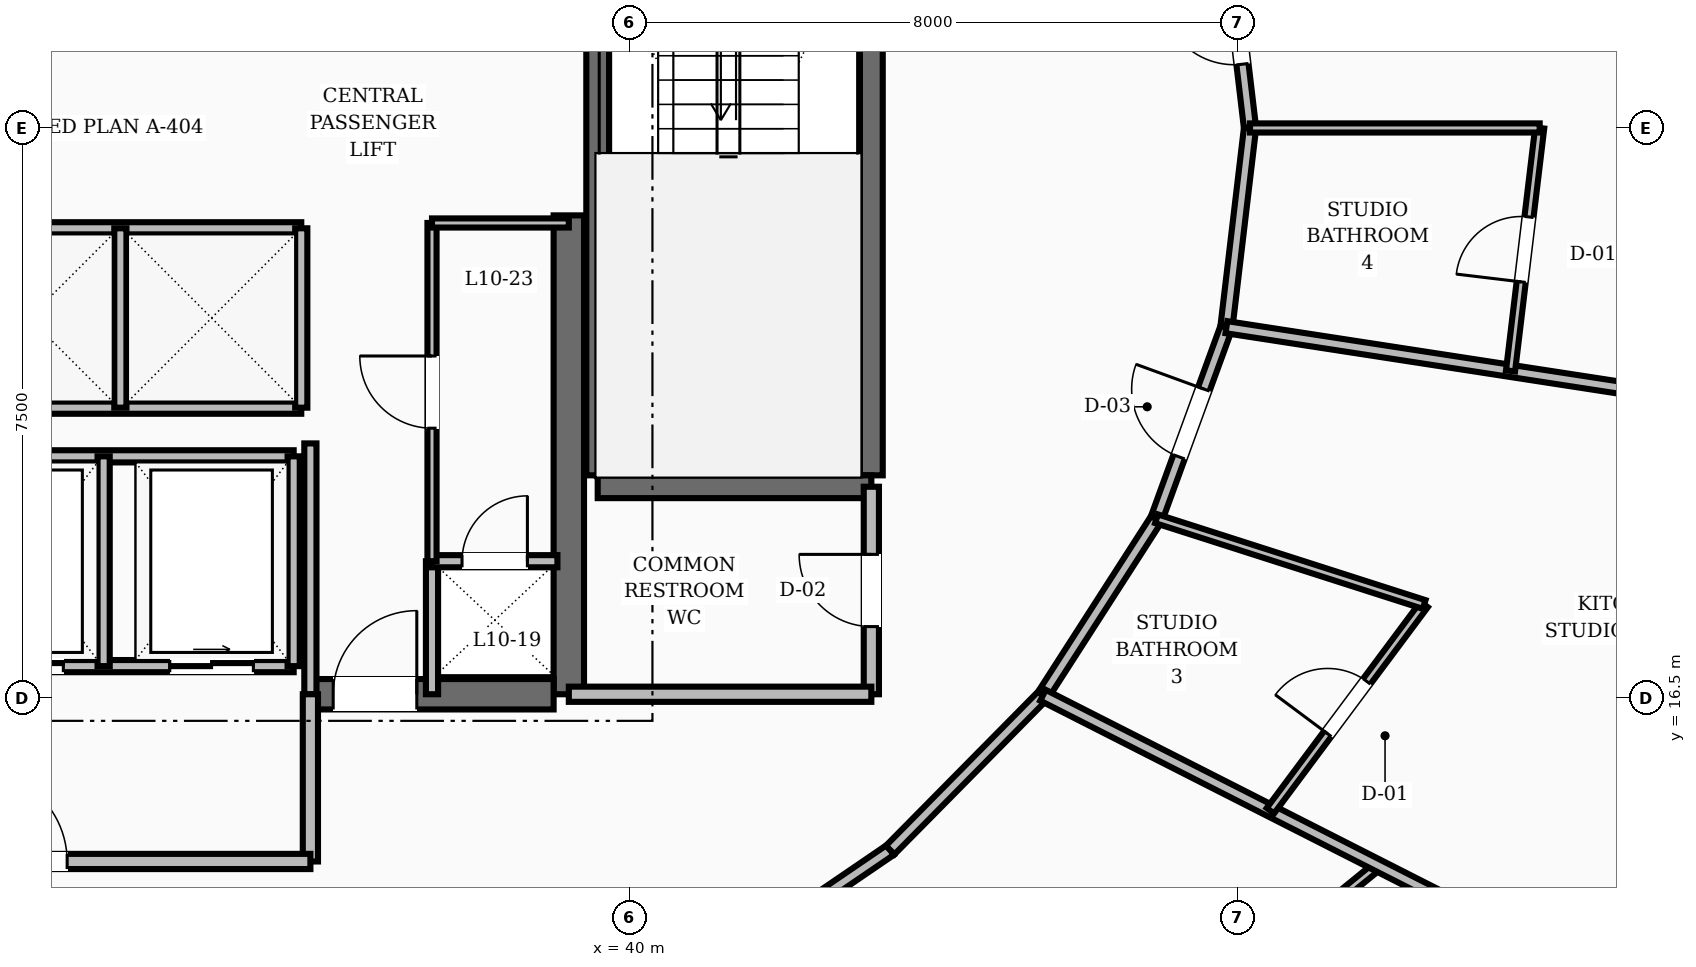
"""IFC4 building model, lengths in metres.
Left out: names, types, materials, properties, quantities, classifications, styles, units other than length and angle.
Written with IfcOpenShell. Run it as: python <this file> out.ifc"""

import sys

from ifc_helpers import new_model, si_unit, direction, frame, frame_2d, origin, place, context, subcontext, project, spatial, rectangle, extrude, element, fill, save


model = new_model("IFC4")
c1 = context("Model", 3, precision=1e-05, world=origin(), true_north=direction((0.0, 1.0)))
c2 = subcontext(c1, "Body", "Model", "MODEL_VIEW")
j1 = project(units=[si_unit("LENGTHUNIT", "METRE"), si_unit("PLANEANGLEUNIT", "RADIAN")], contexts=[c1])
p1 = place(None, origin())
s1 = spatial("IfcSite", under=j1, at=p1, CompositionType="ELEMENT")
p2 = place(p1, origin())
s2 = spatial("IfcBuilding", under=s1, at=p2, CompositionType="ELEMENT")
p3 = place(p2, frame((0.0, 0.0, 44.8)))
s3 = spatial("IfcBuildingStorey", under=s2, at=p3, CompositionType="ELEMENT", Elevation=44.8)
p4 = place(p3, frame((39.2, 16.55, 0.0), z_axis=(0.0, 0.0, 1.0), x_axis=(0.0, 1.0, 0.0)))
e1 = element("IfcWall", 1, at=p4, inside=s3, PredefinedType="SHEAR", context=c2, shape_type="SweptSolid", body=[
    extrude(rectangle(XDim=6.3, YDim=0.4, at=frame_2d((3.15, 0.0))), origin(), (0.0, 0.0, 1.0), 3.6),
])
p5 = place(p3, frame((35.8, 16.55, 0.0), z_axis=(0.0, 0.0, 1.0), x_axis=(1.0, 0.0, 0.0)))
e2 = element("IfcWall", 2, at=p5, inside=s3, PredefinedType="SHEAR", context=c2, shape_type="SweptSolid", body=[
    extrude(rectangle(XDim=3.2, YDim=0.4, at=frame_2d((1.6, 0.0))), origin(), (0.0, 0.0, 1.0), 3.6),
])
p6 = place(p5, frame((0.3, 0.0, 0.0)))
e3 = element("IfcOpeningElement", 3, at=p6, cuts=e2, PredefinedType="OPENING", context=c2, shape_type="SweptSolid", body=[
    extrude(rectangle(XDim=1.1, YDim=2.1, at=frame_2d((0.55, 1.05))), frame((0.0, 0.21, 0.0), z_axis=(0.0, -1.0, 0.0), x_axis=(1.0, 0.0, 0.0)), (0.0, 0.0, 1.0), 0.42),
])
for number, where, z_axis, x_axis in (
    (4, (43.18, 19.43, 0.0), (0.0, 0.0, 1.0), (0.0, 1.0, 0.0)),
    (5, (39.58, 19.43, 0.0), (0.0, 0.0, 1.0), (0.0, 1.0, 0.0)),
):
    element("IfcWall", number, at=place(p3, frame(where, z_axis=z_axis, x_axis=x_axis)), inside=s3, PredefinedType="SHEAR", context=c2, shape_type="SweptSolid", body=[
        extrude(rectangle(XDim=8.74, YDim=0.3, at=frame_2d((4.37, 0.0))), origin(), (0.0, 0.0, 1.0), 3.6),
    ])
p7 = place(p3, frame((39.58, 19.28, 0.0), z_axis=(0.0, 0.0, 1.0), x_axis=(1.0, 0.0, 0.0)))
e6 = element("IfcWall", 6, at=p7, inside=s3, PredefinedType="SHEAR", context=c2, shape_type="SweptSolid", body=[
    extrude(rectangle(XDim=3.6, YDim=0.3, at=frame_2d((1.8, 0.0))), origin(), (0.0, 0.0, 1.0), 3.6),
])
p8 = place(p3, frame((43.18, 16.55, 0.0), z_axis=(0.0, 0.0, 1.0), x_axis=(0.0, 1.0, 0.0)))
e7 = element("IfcWall", 7, at=p8, inside=s3, PredefinedType="SOLIDWALL", context=c2, shape_type="SweptSolid", body=[
    extrude(rectangle(XDim=2.73, YDim=0.2, at=frame_2d((1.365, 0.0))), origin(), (0.0, 0.0, 1.0), 2.61),
])
p9 = place(p8, frame((0.89, 0.0, 0.0)))
e8 = element("IfcOpeningElement", 8, at=p9, cuts=e7, PredefinedType="OPENING", context=c2, shape_type="SweptSolid", body=[
    extrude(rectangle(XDim=0.95, YDim=2.1, at=frame_2d((0.475, 1.05))), frame((0.0, 0.11, 0.0), z_axis=(0.0, -1.0, 0.0), x_axis=(1.0, 0.0, 0.0)), (0.0, 0.0, 1.0), 0.22),
])
p10 = place(p3, frame((39.2, 16.55, 0.0), z_axis=(0.0, 0.0, 1.0), x_axis=(1.0, 0.0, 0.0)))
e9 = element("IfcWall", 9, at=p10, inside=s3, PredefinedType="SOLIDWALL", context=c2, shape_type="SweptSolid", body=[
    extrude(rectangle(XDim=3.98, YDim=0.2, at=frame_2d((1.99, 0.0))), origin(), (0.0, 0.0, 1.0), 2.61),
])
p11 = place(p3, frame((35.8, 16.55, 0.0), z_axis=(0.0, 0.0, 1.0), x_axis=(0.0, 1.0, 0.0)))
e10 = element("IfcWall", 10, at=p11, inside=s3, PredefinedType="SOLIDWALL", context=c2, shape_type="SweptSolid", body=[
    extrude(rectangle(XDim=3.3, YDim=0.16, at=frame_2d((1.65, 0.0))), origin(), (0.0, 0.0, 1.0), 2.61),
])
p12 = place(p3, frame((37.4, 16.55, 0.0), z_axis=(0.0, 0.0, 1.0), x_axis=(0.0, 1.0, 0.0)))
e11 = element("IfcWall", 11, at=p12, inside=s3, PredefinedType="SOLIDWALL", context=c2, shape_type="SweptSolid", body=[
    extrude(rectangle(XDim=1.75, YDim=0.16, at=frame_2d((0.875, 0.0))), origin(), (0.0, 0.0, 1.0), 2.61),
])
p13 = place(p3, frame((35.8, 14.35, 0.0), z_axis=(0.0, 0.0, 1.0), x_axis=(0.0, 1.0, 0.0)))
e12 = element("IfcWall", 12, at=p13, inside=s3, PredefinedType="SOLIDWALL", context=c2, shape_type="SweptSolid", body=[
    extrude(rectangle(XDim=2.2, YDim=0.2, at=frame_2d((1.1, 0.0))), origin(), (0.0, 0.0, 1.0), 2.61),
])
p14 = place(p3, frame((28.2, 14.35, 0.0), z_axis=(0.0, 0.0, 1.0), x_axis=(1.0, 0.0, 0.0)))
e13 = element("IfcWall", 13, at=p14, inside=s3, PredefinedType="SOLIDWALL", context=c2, shape_type="SweptSolid", body=[
    extrude(rectangle(XDim=7.6, YDim=0.2, at=frame_2d((3.8, 0.0))), origin(), (0.0, 0.0, 1.0), 2.61),
])
p15 = place(p14, frame((3.2, 0.0, 0.0)))
e14 = element("IfcOpeningElement", 14, at=p15, cuts=e13, PredefinedType="OPENING", context=c2, shape_type="SweptSolid", body=[
    extrude(rectangle(XDim=1.2, YDim=2.1, at=frame_2d((0.6, 1.05))), frame((0.0, 0.11, 0.0), z_axis=(0.0, -1.0, 0.0), x_axis=(1.0, 0.0, 0.0)), (0.0, 0.0, 1.0), 0.22),
])
for number, where, z_axis, x_axis in (
    (15, (30.92, 22.68, 0.0), (0.0, 0.0, 1.0), (1.0, 0.0, 0.0)),
    (16, (30.92, 20.32, 0.0), (0.0, 0.0, 1.0), (1.0, 0.0, 0.0)),
):
    element("IfcWall", number, at=place(p3, frame(where, z_axis=z_axis, x_axis=x_axis)), inside=s3, PredefinedType="SOLIDWALL", context=c2, shape_type="SweptSolid", body=[
        extrude(rectangle(XDim=4.76, YDim=0.16, at=frame_2d((2.38, 0.0))), origin(), (0.0, 0.0, 1.0), 2.61),
    ])
for number, where, z_axis, x_axis in (
    (17, (33.3, 20.32, 0.0), (0.0, 0.0, 1.0), (0.0, 1.0, 0.0)),
    (18, (35.68, 20.32, 0.0), (0.0, 0.0, 1.0), (0.0, 1.0, 0.0)),
):
    element("IfcWall", number, at=place(p3, frame(where, z_axis=z_axis, x_axis=x_axis)), inside=s3, PredefinedType="SOLIDWALL", context=c2, shape_type="SweptSolid", body=[
        extrude(rectangle(XDim=2.36, YDim=0.16, at=frame_2d((1.18, 0.0))), origin(), (0.0, 0.0, 1.0), 2.61),
    ])
p16 = place(p3, frame((28.42, 16.92, 0.0), z_axis=(0.0, 0.0, 1.0), x_axis=(1.0, 0.0, 0.0)))
e19 = element("IfcWall", 19, at=p16, inside=s3, PredefinedType="SOLIDWALL", context=c2, shape_type="SweptSolid", body=[
    extrude(rectangle(XDim=7.16, YDim=0.16, at=frame_2d((3.58, 0.0))), origin(), (0.0, 0.0, 1.0), 2.61),
])
p17 = place(p16, frame((0.53, 0.0, 0.0)))
e20 = element("IfcOpeningElement", 20, at=p17, cuts=e19, PredefinedType="OPENING", context=c2, shape_type="SweptSolid", body=[
    extrude(rectangle(XDim=1.1, YDim=2.15, at=frame_2d((0.55, 1.075))), frame((0.0, 0.09, 0.0), z_axis=(0.0, -1.0, 0.0), x_axis=(1.0, 0.0, 0.0)), (0.0, 0.0, 1.0), 0.18),
])
p18 = place(p16, frame((3.03, 0.0, 0.0)))
e21 = element("IfcOpeningElement", 21, at=p18, cuts=e19, PredefinedType="OPENING", context=c2, shape_type="SweptSolid", body=[
    extrude(rectangle(XDim=1.1, YDim=2.15, at=frame_2d((0.55, 1.075))), frame((0.0, 0.09, 0.0), z_axis=(0.0, -1.0, 0.0), x_axis=(1.0, 0.0, 0.0)), (0.0, 0.0, 1.0), 0.18),
])
p19 = place(p16, frame((5.53, 0.0, 0.0)))
e22 = element("IfcOpeningElement", 22, at=p19, cuts=e19, PredefinedType="OPENING", context=c2, shape_type="SweptSolid", body=[
    extrude(rectangle(XDim=1.1, YDim=2.15, at=frame_2d((0.55, 1.075))), frame((0.0, 0.09, 0.0), z_axis=(0.0, -1.0, 0.0), x_axis=(1.0, 0.0, 0.0)), (0.0, 0.0, 1.0), 0.18),
])
p20 = place(p3, frame((28.42, 19.68, 0.0), z_axis=(0.0, 0.0, 1.0), x_axis=(1.0, 0.0, 0.0)))
e23 = element("IfcWall", 23, at=p20, inside=s3, PredefinedType="SOLIDWALL", context=c2, shape_type="SweptSolid", body=[
    extrude(rectangle(XDim=7.16, YDim=0.16, at=frame_2d((3.58, 0.0))), origin(), (0.0, 0.0, 1.0), 2.61),
])
for number, where, z_axis, x_axis in (
    (24, (33.08, 16.92, 0.0), (0.0, 0.0, 1.0), (0.0, 1.0, 0.0)),
    (25, (35.58, 16.92, 0.0), (0.0, 0.0, 1.0), (0.0, 1.0, 0.0)),
):
    element("IfcWall", number, at=place(p3, frame(where, z_axis=z_axis, x_axis=x_axis)), inside=s3, PredefinedType="SOLIDWALL", context=c2, shape_type="SweptSolid", body=[
        extrude(rectangle(XDim=2.76, YDim=0.16, at=frame_2d((1.38, 0.0))), origin(), (0.0, 0.0, 1.0), 2.61),
    ])
p21 = place(p3, frame((37.4, 18.3, 0.0), z_axis=(0.0, 0.0, 1.0), x_axis=(1.0, 0.0, 0.0)))
e26 = element("IfcWall", 26, at=p21, inside=s3, PredefinedType="SOLIDWALL", context=c2, shape_type="SweptSolid", body=[
    extrude(rectangle(XDim=1.65, YDim=0.16, at=frame_2d((0.825, 0.0))), origin(), (0.0, 0.0, 1.0), 2.61),
])
p22 = place(p21, frame((0.395, 0.0, 0.0)))
e27 = element("IfcOpeningElement", 27, at=p22, cuts=e26, PredefinedType="OPENING", context=c2, shape_type="SweptSolid", body=[
    extrude(rectangle(XDim=0.86, YDim=2.1, at=frame_2d((0.43, 1.05))), frame((0.0, 0.09, 0.0), z_axis=(0.0, -1.0, 0.0), x_axis=(1.0, 0.0, 0.0)), (0.0, 0.0, 1.0), 0.18),
])
p23 = place(p3, frame((37.4, 18.3, 0.0), z_axis=(0.0, 0.0, 1.0), x_axis=(0.0, 1.0, 0.0)))
e28 = element("IfcWall", 28, at=p23, inside=s3, PredefinedType="PARTITIONING", context=c2, shape_type="SweptSolid", body=[
    extrude(rectangle(XDim=4.45, YDim=0.12, at=frame_2d((2.225, 0.0))), origin(), (0.0, 0.0, 1.0), 2.61),
])
p24 = place(p23, frame((1.75, 0.0, 0.0)))
e29 = element("IfcOpeningElement", 29, at=p24, cuts=e28, PredefinedType="OPENING", context=c2, shape_type="SweptSolid", body=[
    extrude(rectangle(XDim=0.95, YDim=2.1, at=frame_2d((0.475, 1.05))), frame((0.0, 0.07, 0.0), z_axis=(0.0, -1.0, 0.0), x_axis=(1.0, 0.0, 0.0)), (0.0, 0.0, 1.0), 0.14),
])
p25 = place(p3, frame((37.4, 22.75, 0.0), z_axis=(0.0, 0.0, 1.0), x_axis=(1.0, 0.0, 0.0)))
e30 = element("IfcWall", 30, at=p25, inside=s3, PredefinedType="PARTITIONING", context=c2, shape_type="SweptSolid", body=[
    extrude(rectangle(XDim=1.8, YDim=0.12, at=frame_2d((0.9, 0.0))), origin(), (0.0, 0.0, 1.0), 2.61),
])
p26 = place(p3, frame((48.162, 24.0, 0.0), z_axis=(0.0, 0.0, 1.0), x_axis=(-0.117667763342, 0.993053018459, 0.0)))
e31 = element("IfcWall", 31, at=p26, inside=s3, PredefinedType="SOLIDWALL", context=c2, shape_type="SweptSolid", body=[
    extrude(rectangle(XDim=2.639, YDim=0.16, at=frame_2d((1.32, 0.0))), origin(), (0.0, 0.0, 1.0), 2.61),
])
p27 = place(p26, frame((0.844, 0.0, 0.0)))
e32 = element("IfcOpeningElement", 32, at=p27, cuts=e31, PredefinedType="OPENING", context=c2, shape_type="SweptSolid", body=[
    extrude(rectangle(XDim=0.95, YDim=2.1, at=frame_2d((0.475, 1.05))), frame((0.0, 0.09, 0.0), z_axis=(0.0, -1.0, 0.0), x_axis=(1.0, 0.0, 0.0)), (0.0, 0.0, 1.0), 0.18),
])
p28 = place(p3, frame((40.979, 12.83, 0.0), z_axis=(0.0, 0.0, 1.0), x_axis=(0.826112340767, 0.563505457323, 0.0)))
e33 = element("IfcWall", 33, at=p28, inside=s3, PredefinedType="SOLIDWALL", context=c2, shape_type="SweptSolid", body=[
    extrude(rectangle(XDim=2.965, YDim=0.16, at=frame_2d((1.482, 0.0))), origin(), (0.0, 0.0, 1.0), 2.61),
])
p29 = place(p3, frame((43.428, 14.501, 0.0), z_axis=(0.0, 0.0, 1.0), x_axis=(0.702569520063, 0.711615113301, 0.0)))
e34 = element("IfcWall", 34, at=p29, inside=s3, PredefinedType="SOLIDWALL", context=c2, shape_type="SweptSolid", body=[
    extrude(rectangle(XDim=2.861, YDim=0.16, at=frame_2d((1.43, 0.0))), origin(), (0.0, 0.0, 1.0), 2.61),
])
p30 = place(p3, frame((45.438, 16.537, 0.0), z_axis=(0.0, 0.0, 1.0), x_axis=(0.540891657444, 0.841092274907, 0.0)))
e35 = element("IfcWall", 35, at=p30, inside=s3, PredefinedType="SOLIDWALL", context=c2, shape_type="SweptSolid", body=[
    extrude(rectangle(XDim=2.761, YDim=0.16, at=frame_2d((1.38, 0.0))), origin(), (0.0, 0.0, 1.0), 2.61),
])
p31 = place(p3, frame((46.932, 18.859, 0.0), z_axis=(0.0, 0.0, 1.0), x_axis=(0.342882618672, 0.939378257047, 0.0)))
e36 = element("IfcWall", 36, at=p31, inside=s3, PredefinedType="SOLIDWALL", context=c2, shape_type="SweptSolid", body=[
    extrude(rectangle(XDim=2.683, YDim=0.16, at=frame_2d((1.341, 0.0))), origin(), (0.0, 0.0, 1.0), 2.61),
])
p32 = place(p31, frame((0.866, 0.0, 0.0)))
e37 = element("IfcOpeningElement", 37, at=p32, cuts=e36, PredefinedType="OPENING", context=c2, shape_type="SweptSolid", body=[
    extrude(rectangle(XDim=0.95, YDim=2.1, at=frame_2d((0.475, 1.05))), frame((0.0, 0.09, 0.0), z_axis=(0.0, -1.0, 0.0), x_axis=(1.0, 0.0, 0.0)), (0.0, 0.0, 1.0), 0.18),
])
p33 = place(p3, frame((47.852, 21.379, 0.0), z_axis=(0.0, 0.0, 1.0), x_axis=(0.117667763342, 0.993053018459, 0.0)))
e38 = element("IfcWall", 38, at=p33, inside=s3, PredefinedType="SOLIDWALL", context=c2, shape_type="SweptSolid", body=[
    extrude(rectangle(XDim=2.639, YDim=0.16, at=frame_2d((1.32, 0.0))), origin(), (0.0, 0.0, 1.0), 2.61),
])
p34 = place(p3, frame((43.925, 9.479, 0.0), z_axis=(0.0, 0.0, 1.0), x_axis=(0.775688329038, 0.631116166957, 0.0)))
e39 = element("IfcWall", 39, at=p34, inside=s3, PredefinedType="PARTITIONING", context=c2, shape_type="SweptSolid", body=[
    extrude(rectangle(XDim=7.635, YDim=0.12, at=frame_2d((3.817, 0.0))), origin(), (0.0, 0.0, 1.0), 2.61),
])
p35 = place(p34, frame((3.342, 0.0, 0.0)))
e40 = element("IfcOpeningElement", 40, at=p35, cuts=e39, PredefinedType="OPENING", context=c2, shape_type="SweptSolid", body=[
    extrude(rectangle(XDim=0.95, YDim=2.1, at=frame_2d((0.475, 1.05))), frame((0.0, 0.07, 0.0), z_axis=(0.0, -1.0, 0.0), x_axis=(1.0, 0.0, 0.0)), (0.0, 0.0, 1.0), 0.14),
])
p36 = place(p3, frame((45.438, 16.537, 0.0), z_axis=(0.0, 0.0, 1.0), x_axis=(0.891601143044, -0.452821600327, 0.0)))
e41 = element("IfcWall", 41, at=p36, inside=s3, PredefinedType="SOLIDWALL", context=c2, shape_type="SweptSolid", body=[
    extrude(rectangle(XDim=8.78, YDim=0.16, at=frame_2d((4.39, 0.0))), origin(), (0.0, 0.0, 1.0), 2.61),
])
p37 = place(p3, frame((48.43, 15.017, 0.0), z_axis=(0.0, 0.0, 1.0), x_axis=(0.597596813452, 0.801796762623, 0.0)))
e42 = element("IfcWall", 42, at=p37, inside=s3, PredefinedType="PARTITIONING", context=c2, shape_type="SweptSolid", body=[
    extrude(rectangle(XDim=3.385, YDim=0.12, at=frame_2d((1.692, 0.0))), origin(), (0.0, 0.0, 1.0), 2.61),
])
p38 = place(p37, frame((1.262, 0.0, 0.0)))
e43 = element("IfcOpeningElement", 43, at=p38, cuts=e42, PredefinedType="OPENING", context=c2, shape_type="SweptSolid", body=[
    extrude(rectangle(XDim=0.86, YDim=2.1, at=frame_2d((0.43, 1.05))), frame((0.0, 0.07, 0.0), z_axis=(0.0, -1.0, 0.0), x_axis=(1.0, 0.0, 0.0)), (0.0, 0.0, 1.0), 0.14),
])
p39 = place(p3, frame((46.932, 18.859, 0.0), z_axis=(0.0, 0.0, 1.0), x_axis=(0.952329028564, -0.3050728132, 0.0)))
e44 = element("IfcWall", 44, at=p39, inside=s3, PredefinedType="PARTITIONING", context=c2, shape_type="SweptSolid", body=[
    extrude(rectangle(XDim=3.697, YDim=0.12, at=frame_2d((1.849, 0.0))), origin(), (0.0, 0.0, 1.0), 2.61),
])
p40 = place(p3, frame((47.852, 21.379, 0.0), z_axis=(0.0, 0.0, 1.0), x_axis=(0.988371982693, -0.152055331469, 0.0)))
e45 = element("IfcWall", 45, at=p40, inside=s3, PredefinedType="SOLIDWALL", context=c2, shape_type="SweptSolid", body=[
    extrude(rectangle(XDim=9.902, YDim=0.16, at=frame_2d((4.951, 0.0))), origin(), (0.0, 0.0, 1.0), 2.61),
])
p41 = place(p3, frame((51.589, 20.804, 0.0), z_axis=(0.0, 0.0, 1.0), x_axis=(0.119234947107, 0.992866067196, 0.0)))
e46 = element("IfcWall", 46, at=p41, inside=s3, PredefinedType="PARTITIONING", context=c2, shape_type="SweptSolid", body=[
    extrude(rectangle(XDim=3.219, YDim=0.12, at=frame_2d((1.609, 0.0))), origin(), (0.0, 0.0, 1.0), 2.61),
])
p42 = place(p41, frame((1.179, 0.0, 0.0)))
e47 = element("IfcOpeningElement", 47, at=p42, cuts=e46, PredefinedType="OPENING", context=c2, shape_type="SweptSolid", body=[
    extrude(rectangle(XDim=0.86, YDim=2.1, at=frame_2d((0.43, 1.05))), frame((0.0, 0.07, 0.0), z_axis=(0.0, -1.0, 0.0), x_axis=(1.0, 0.0, 0.0)), (0.0, 0.0, 1.0), 0.14),
])
p43 = place(p3, frame((48.162, 24.0, 0.0), z_axis=(0.0, 0.0, 1.0), x_axis=(1.0, 0.0, 0.0)))
e48 = element("IfcWall", 48, at=p43, inside=s3, PredefinedType="PARTITIONING", context=c2, shape_type="SweptSolid", body=[
    extrude(rectangle(XDim=3.811, YDim=0.12, at=frame_2d((1.905, 0.0))), origin(), (0.0, 0.0, 1.0), 2.61),
])
p44 = place(p9, origin())
e49 = element("IfcDoor", 49, at=p44, inside=s3, OperationType="SINGLE_SWING_RIGHT", PredefinedType="DOOR", context=c2, shape_type="SweptSolid", body=[
    extrude(rectangle(XDim=0.95, YDim=2.1, at=frame_2d((0.475, 1.05))), frame((0.0, 0.025, 0.0), z_axis=(0.0, -1.0, 0.0), x_axis=(1.0, 0.0, 0.0)), (0.0, 0.0, 1.0), 0.05),
])
fill(e8, e49)
p45 = place(p6, origin())
e50 = element("IfcDoor", 50, at=p45, inside=s3, OperationType="SINGLE_SWING_RIGHT", PredefinedType="DOOR", context=c2, shape_type="SweptSolid", body=[
    extrude(rectangle(XDim=1.1, YDim=2.1, at=frame_2d((0.55, 1.05))), frame((0.0, 0.025, 0.0), z_axis=(0.0, -1.0, 0.0), x_axis=(1.0, 0.0, 0.0)), (0.0, 0.0, 1.0), 0.05),
])
fill(e3, e50)
p46 = place(p15, origin())
e51 = element("IfcDoor", 51, at=p46, inside=s3, OperationType="SINGLE_SWING_LEFT", PredefinedType="DOOR", context=c2, shape_type="SweptSolid", body=[
    extrude(rectangle(XDim=1.2, YDim=2.1, at=frame_2d((0.6, 1.05))), frame((0.0, 0.025, 0.0), z_axis=(0.0, -1.0, 0.0), x_axis=(1.0, 0.0, 0.0)), (0.0, 0.0, 1.0), 0.05),
])
fill(e14, e51)
p47 = place(p18, origin())
e52 = element("IfcDoor", 52, at=p47, inside=s3, OperationType="SLIDING_TO_RIGHT", PredefinedType="DOOR", context=c2, shape_type="SweptSolid", body=[
    extrude(rectangle(XDim=1.1, YDim=2.15, at=frame_2d((0.55, 1.075))), frame((0.0, 0.025, 0.0), z_axis=(0.0, -1.0, 0.0), x_axis=(1.0, 0.0, 0.0)), (0.0, 0.0, 1.0), 0.05),
])
fill(e21, e52)
p48 = place(p19, origin())
e53 = element("IfcDoor", 53, at=p48, inside=s3, OperationType="SLIDING_TO_RIGHT", PredefinedType="DOOR", context=c2, shape_type="SweptSolid", body=[
    extrude(rectangle(XDim=1.1, YDim=2.15, at=frame_2d((0.55, 1.075))), frame((0.0, 0.025, 0.0), z_axis=(0.0, -1.0, 0.0), x_axis=(1.0, 0.0, 0.0)), (0.0, 0.0, 1.0), 0.05),
])
fill(e22, e53)
p49 = place(p22, origin())
e54 = element("IfcDoor", 54, at=p49, inside=s3, OperationType="SINGLE_SWING_RIGHT", PredefinedType="TRAPDOOR", context=c2, shape_type="SweptSolid", body=[
    extrude(rectangle(XDim=0.86, YDim=2.1, at=frame_2d((0.43, 1.05))), frame((0.0, 0.025, 0.0), z_axis=(0.0, -1.0, 0.0), x_axis=(1.0, 0.0, 0.0)), (0.0, 0.0, 1.0), 0.05),
])
fill(e27, e54)
p50 = place(p24, origin())
e55 = element("IfcDoor", 55, at=p50, inside=s3, OperationType="SINGLE_SWING_RIGHT", PredefinedType="DOOR", context=c2, shape_type="SweptSolid", body=[
    extrude(rectangle(XDim=0.95, YDim=2.1, at=frame_2d((0.475, 1.05))), frame((0.0, 0.025, 0.0), z_axis=(0.0, -1.0, 0.0), x_axis=(1.0, 0.0, 0.0)), (0.0, 0.0, 1.0), 0.05),
])
fill(e29, e55)
p51 = place(p38, origin())
e56 = element("IfcDoor", 56, at=p51, inside=s3, OperationType="SINGLE_SWING_LEFT", PredefinedType="DOOR", context=c2, shape_type="SweptSolid", body=[
    extrude(rectangle(XDim=0.86, YDim=2.1, at=frame_2d((0.43, 1.05))), frame((0.0, 0.025, 0.0), z_axis=(0.0, -1.0, 0.0), x_axis=(1.0, 0.0, 0.0)), (0.0, 0.0, 1.0), 0.05),
])
fill(e43, e56)
p52 = place(p32, origin())
e57 = element("IfcDoor", 57, at=p52, inside=s3, OperationType="SINGLE_SWING_RIGHT", PredefinedType="DOOR", context=c2, shape_type="SweptSolid", body=[
    extrude(rectangle(XDim=0.95, YDim=2.1, at=frame_2d((0.475, 1.05))), frame((0.0, 0.025, 0.0), z_axis=(0.0, -1.0, 0.0), x_axis=(1.0, 0.0, 0.0)), (0.0, 0.0, 1.0), 0.05),
])
fill(e37, e57)
p53 = place(p42, origin())
e58 = element("IfcDoor", 58, at=p53, inside=s3, OperationType="SINGLE_SWING_LEFT", PredefinedType="DOOR", context=c2, shape_type="SweptSolid", body=[
    extrude(rectangle(XDim=0.86, YDim=2.1, at=frame_2d((0.43, 1.05))), frame((0.0, 0.025, 0.0), z_axis=(0.0, -1.0, 0.0), x_axis=(1.0, 0.0, 0.0)), (0.0, 0.0, 1.0), 0.05),
])
fill(e47, e58)
p54 = place(p27, origin())
e59 = element("IfcDoor", 59, at=p54, inside=s3, OperationType="SINGLE_SWING_RIGHT", PredefinedType="DOOR", context=c2, shape_type="SweptSolid", body=[
    extrude(rectangle(XDim=0.95, YDim=2.1, at=frame_2d((0.475, 1.05))), frame((0.0, 0.025, 0.0), z_axis=(0.0, -1.0, 0.0), x_axis=(1.0, 0.0, 0.0)), (0.0, 0.0, 1.0), 0.05),
])
fill(e32, e59)
save(model, sys.argv[1])
